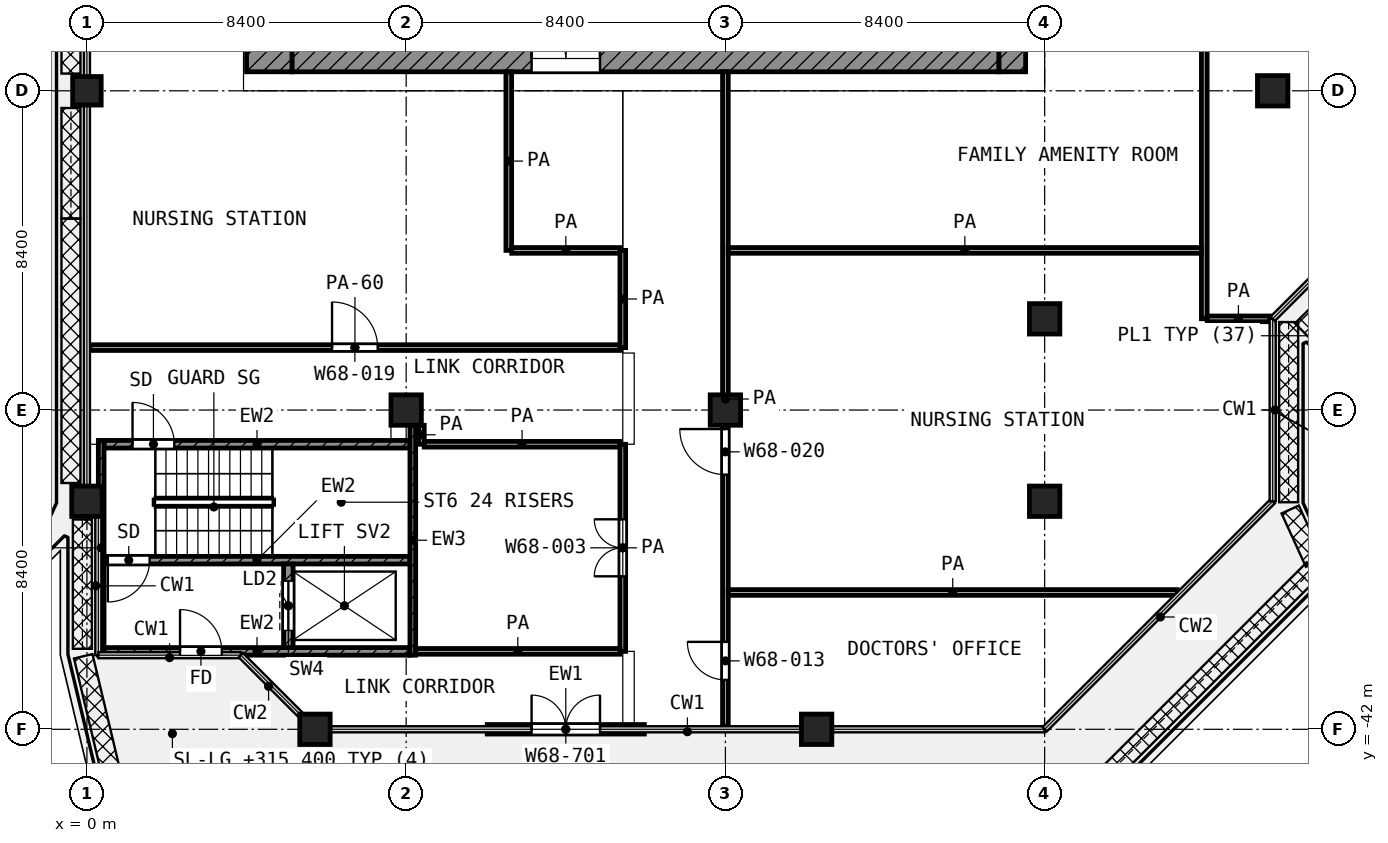
"""IFC4 building model, lengths in metres.
Left out: names, types, materials, properties, quantities, classifications, styles, units other than length and angle.
Written with IfcOpenShell. Run it as: python <this file> out.ifc"""

import sys

from ifc_helpers import new_model, si_unit, direction, frame, frame_2d, origin, origin_2d, place, context, subcontext, project, spatial, rectangle, extrude, element, fill, save


model = new_model("IFC4")
c1 = context("Model", 3, precision=1e-05, world=origin(), true_north=direction((0.0, 1.0)))
c2 = subcontext(c1, "Body", "Model", "MODEL_VIEW")
j1 = project(units=[si_unit("LENGTHUNIT", "METRE"), si_unit("PLANEANGLEUNIT", "RADIAN")], contexts=[c1])
p1 = place(None, origin())
s1 = spatial("IfcSite", under=j1, at=p1, CompositionType="ELEMENT")
p2 = place(p1, origin())
s2 = spatial("IfcBuilding", under=s1, at=p2, CompositionType="ELEMENT")
p3 = place(p2, frame((0.0, 0.0, 315.4)))
s3 = spatial("IfcBuildingStorey", under=s2, at=p3, CompositionType="ELEMENT", Elevation=315.4)
p4 = place(p3, frame((0.0, -25.2, 0.0), z_axis=(0.0, 0.0, 1.0), x_axis=(1.0, 0.0, 0.0)))
e1 = element("IfcColumn", 1, at=p4, inside=s3, PredefinedType="COLUMN", context=c2, shape_type="SweptSolid", body=[
    extrude(rectangle(XDim=0.75, YDim=0.75, at=origin_2d()), origin(), (0.0, 0.0, 1.0), 4.2),
])
for number, where, z_axis, x_axis in (
    (2, (31.2, -25.2, 0.0), (0.0, 0.0, 1.0), (1.0, 0.0, 0.0)),
    (3, (25.2, -31.2, 0.0), (0.0, 0.0, 1.0), (1.0, 0.0, 0.0)),
    (4, (8.4, -33.6, 0.0), (0.0, 0.0, 1.0), (1.0, 0.0, 0.0)),
    (5, (16.8, -33.6, 0.0), (0.0, 0.0, 1.0), (1.0, 0.0, 0.0)),
    (6, (0.0, -36.0, 0.0), (0.0, 0.0, 1.0), (1.0, 0.0, 0.0)),
    (7, (25.2, -36.0, 0.0), (0.0, 0.0, 1.0), (1.0, 0.0, 0.0)),
    (8, (6.0, -42.0, 0.0), (0.0, 0.0, 1.0), (1.0, 0.0, 0.0)),
    (9, (19.2, -42.0, 0.0), (0.0, 0.0, 1.0), (1.0, 0.0, 0.0)),
):
    element("IfcColumn", number, at=place(p3, frame(where, z_axis=z_axis, x_axis=x_axis)), inside=s3, PredefinedType="COLUMN", context=c2, shape_type="SweptSolid", body=[
        extrude(rectangle(XDim=0.8, YDim=0.8, at=origin_2d()), origin(), (0.0, 0.0, 1.0), 4.2),
    ])
p5 = place(p3, frame((10.533, -42.0, 0.0), z_axis=(0.0, 0.0, 1.0), x_axis=(1.0, 0.0, 0.0)))
e10 = element("IfcWall", 10, at=p5, inside=s3, PredefinedType="SOLIDWALL", context=c2, shape_type="SweptSolid", body=[
    extrude(rectangle(XDim=4.133, YDim=0.25, at=frame_2d((2.067, 0.0))), origin(), (0.0, 0.0, 1.0), 3.48),
])
p6 = place(p5, frame((1.167, 0.0, 0.0)))
e11 = element("IfcOpeningElement", 11, at=p6, cuts=e10, PredefinedType="OPENING", context=c2, shape_type="SweptSolid", body=[
    extrude(rectangle(XDim=1.8, YDim=2.1, at=frame_2d((0.9, 1.05))), frame((0.0, 0.135, 0.0), z_axis=(0.0, -1.0, 0.0), x_axis=(1.0, 0.0, 0.0)), (0.0, 0.0, 1.0), 0.27),
])
p7 = place(p3, frame((4.8, -24.7, 0.0), z_axis=(0.0, 0.0, 1.0), x_axis=(0.0, 1.0, 0.0)))
e12 = element("IfcWall", 12, at=p7, inside=s3, PredefinedType="SHEAR", context=c2, shape_type="SweptSolid", body=[
    extrude(rectangle(XDim=19.3, YDim=1.2, at=frame_2d((9.65, 0.0))), origin(), (0.0, 0.0, 1.0), 3.6),
])
p8 = place(p7, frame((11.15, 0.0, 0.0)))
e13 = element("IfcOpeningElement", 13, at=p8, cuts=e12, PredefinedType="OPENING", context=c2, shape_type="SweptSolid", body=[
    extrude(rectangle(XDim=1.1, YDim=2.1, at=frame_2d((0.55, 1.05))), frame((0.0, 0.61, 0.0), z_axis=(0.0, -1.0, 0.0), x_axis=(1.0, 0.0, 0.0)), (0.0, 0.0, 1.0), 1.22),
])
p9 = place(p7, frame((1.85, 0.0, 0.0)))
e14 = element("IfcOpeningElement", 14, at=p9, cuts=e12, PredefinedType="OPENING", context=c2, shape_type="SweptSolid", body=[
    extrude(rectangle(XDim=1.1, YDim=2.1, at=frame_2d((0.55, 1.05))), frame((0.0, 0.61, 0.0), z_axis=(0.0, -1.0, 0.0), x_axis=(1.0, 0.0, 0.0)), (0.0, 0.0, 1.0), 1.22),
])
p10 = place(p3, frame((5.4, -24.35, 0.0), z_axis=(0.0, 0.0, 1.0), x_axis=(1.0, 0.0, 0.0)))
e15 = element("IfcWall", 15, at=p10, inside=s3, PredefinedType="SHEAR", context=c2, shape_type="SweptSolid", body=[
    extrude(rectangle(XDim=18.6, YDim=0.7, at=frame_2d((9.3, 0.0))), origin(), (0.0, 0.0, 1.0), 3.6),
])
p11 = place(p10, frame((6.3, 0.0, 0.0)))
e16 = element("IfcOpeningElement", 16, at=p11, cuts=e15, PredefinedType="OPENING", context=c2, shape_type="SweptSolid", body=[
    extrude(rectangle(XDim=1.8, YDim=2.1, at=frame_2d((0.9, 1.05))), frame((0.0, 0.36, 0.0), z_axis=(0.0, -1.0, 0.0), x_axis=(1.0, 0.0, 0.0)), (0.0, 0.0, 1.0), 0.72),
])
p12 = place(p3, frame((24.35, -24.7, 0.0), z_axis=(0.0, 0.0, 1.0), x_axis=(0.0, 1.0, 0.0)))
e17 = element("IfcWall", 17, at=p12, inside=s3, PredefinedType="SHEAR", context=c2, shape_type="SweptSolid", body=[
    extrude(rectangle(XDim=0.7, YDim=0.7, at=frame_2d((0.35, 0.0))), origin(), (0.0, 0.0, 1.0), 3.6),
])
p13 = place(p3, frame((0.375, -40.05, 0.0), z_axis=(0.0, 0.0, 1.0), x_axis=(0.0, 1.0, 0.0)))
e18 = element("IfcWall", 18, at=p13, inside=s3, PredefinedType="SHEAR", context=c2, shape_type="SweptSolid", body=[
    extrude(rectangle(XDim=5.65, YDim=0.15, at=frame_2d((2.825, 0.0))), origin(), (0.0, 0.0, 1.0), 3.6),
])
p14 = place(p3, frame((8.575, -40.05, 0.0), z_axis=(0.0, 0.0, 1.0), x_axis=(0.0, 1.0, 0.0)))
e19 = element("IfcWall", 19, at=p14, inside=s3, PredefinedType="SHEAR", context=c2, shape_type="SweptSolid", body=[
    extrude(rectangle(XDim=6.05, YDim=0.15, at=frame_2d((3.025, 0.0))), origin(), (0.0, 0.0, 1.0), 3.6),
])
p15 = place(p3, frame((0.45, -34.5, 0.0), z_axis=(0.0, 0.0, 1.0), x_axis=(1.0, 0.0, 0.0)))
e20 = element("IfcWall", 20, at=p15, inside=s3, PredefinedType="SHEAR", context=c2, shape_type="SweptSolid", body=[
    extrude(rectangle(XDim=8.05, YDim=0.2, at=frame_2d((4.025, 0.0))), origin(), (0.0, 0.0, 1.0), 3.6),
])
p16 = place(p15, frame((0.75, 0.0, 0.0)))
e21 = element("IfcOpeningElement", 21, at=p16, cuts=e20, PredefinedType="OPENING", context=c2, shape_type="SweptSolid", body=[
    extrude(rectangle(XDim=1.1, YDim=2.1, at=frame_2d((0.55, 1.05))), frame((0.0, 0.11, 0.0), z_axis=(0.0, -1.0, 0.0), x_axis=(1.0, 0.0, 0.0)), (0.0, 0.0, 1.0), 0.22),
])
p17 = place(p3, frame((0.45, -37.55, 0.0), z_axis=(0.0, 0.0, 1.0), x_axis=(1.0, 0.0, 0.0)))
e22 = element("IfcWall", 22, at=p17, inside=s3, PredefinedType="SHEAR", context=c2, shape_type="SweptSolid", body=[
    extrude(rectangle(XDim=8.05, YDim=0.2, at=frame_2d((4.025, 0.0))), origin(), (0.0, 0.0, 1.0), 3.6),
])
p18 = place(p17, frame((0.1, 0.0, 0.0)))
e23 = element("IfcOpeningElement", 23, at=p18, cuts=e22, PredefinedType="OPENING", context=c2, shape_type="SweptSolid", body=[
    extrude(rectangle(XDim=1.1, YDim=2.1, at=frame_2d((0.55, 1.05))), frame((0.0, 0.11, 0.0), z_axis=(0.0, -1.0, 0.0), x_axis=(1.0, 0.0, 0.0)), (0.0, 0.0, 1.0), 0.22),
])
p19 = place(p3, frame((0.45, -39.95, 0.0), z_axis=(0.0, 0.0, 1.0), x_axis=(1.0, 0.0, 0.0)))
e24 = element("IfcWall", 24, at=p19, inside=s3, PredefinedType="SHEAR", context=c2, shape_type="SweptSolid", body=[
    extrude(rectangle(XDim=8.05, YDim=0.2, at=frame_2d((4.025, 0.0))), origin(), (0.0, 0.0, 1.0), 3.6),
])
p20 = place(p19, frame((2.0, 0.0, 0.0)))
e25 = element("IfcOpeningElement", 25, at=p20, cuts=e24, PredefinedType="OPENING", context=c2, shape_type="SweptSolid", body=[
    extrude(rectangle(XDim=1.1, YDim=2.1, at=frame_2d((0.55, 1.05))), frame((0.0, 0.11, 0.0), z_axis=(0.0, -1.0, 0.0), x_axis=(1.0, 0.0, 0.0)), (0.0, 0.0, 1.0), 0.22),
])
p21 = place(p3, frame((5.3, -39.85, 0.0), z_axis=(0.0, 0.0, 1.0), x_axis=(0.0, 1.0, 0.0)))
e26 = element("IfcWall", 26, at=p21, inside=s3, PredefinedType="SHEAR", context=c2, shape_type="SweptSolid", body=[
    extrude(rectangle(XDim=2.2, YDim=0.25, at=frame_2d((1.1, 0.0))), origin(), (0.0, 0.0, 1.0), 3.6),
])
p22 = place(p21, frame((0.45, 0.0, 0.0)))
e27 = element("IfcOpeningElement", 27, at=p22, cuts=e26, PredefinedType="OPENING", context=c2, shape_type="SweptSolid", body=[
    extrude(rectangle(XDim=1.3, YDim=2.1, at=frame_2d((0.65, 1.05))), frame((0.0, 0.135, 0.0), z_axis=(0.0, -1.0, 0.0), x_axis=(1.0, 0.0, 0.0)), (0.0, 0.0, 1.0), 0.27),
])
p23 = place(p3, frame((8.65, -39.95, 0.0), z_axis=(0.0, 0.0, 1.0), x_axis=(1.0, 0.0, 0.0)))
e28 = element("IfcWall", 28, at=p23, inside=s3, PredefinedType="PARTITIONING", context=c2, shape_type="SweptSolid", body=[
    extrude(rectangle(XDim=5.375, YDim=0.15, at=frame_2d((2.688, 0.0))), origin(), (0.0, 0.0, 1.0), 3.6),
])
p24 = place(p3, frame((16.875, -38.4, 0.0), z_axis=(0.0, 0.0, 1.0), x_axis=(1.0, 0.0, 0.0)))
e29 = element("IfcWall", 29, at=p24, inside=s3, PredefinedType="PARTITIONING", context=c2, shape_type="SweptSolid", body=[
    extrude(rectangle(XDim=11.812, YDim=0.15, at=frame_2d((5.906, 0.0))), origin(), (0.0, 0.0, 1.0), 3.6),
])
p25 = place(p3, frame((8.875, -34.5, 0.0), z_axis=(0.0, 0.0, 1.0), x_axis=(1.0, 0.0, 0.0)))
e30 = element("IfcWall", 30, at=p25, inside=s3, PredefinedType="PARTITIONING", context=c2, shape_type="SweptSolid", body=[
    extrude(rectangle(XDim=5.15, YDim=0.15, at=frame_2d((2.575, 0.0))), origin(), (0.0, 0.0, 1.0), 3.6),
])
p26 = place(p3, frame((0.08, -31.957, 0.0), z_axis=(0.0, 0.0, 1.0), x_axis=(1.0, 0.0, 0.0)))
e31 = element("IfcWall", 31, at=p26, inside=s3, PredefinedType="PARTITIONING", context=c2, shape_type="SweptSolid", body=[
    extrude(rectangle(XDim=13.945, YDim=0.15, at=frame_2d((6.972, 0.0))), origin(), (0.0, 0.0, 1.0), 2.7),
])
p27 = place(p26, frame((6.37, 0.0, 0.0)))
e32 = element("IfcOpeningElement", 32, at=p27, cuts=e31, PredefinedType="OPENING", context=c2, shape_type="SweptSolid", body=[
    extrude(rectangle(XDim=1.2, YDim=2.1, at=frame_2d((0.6, 1.05))), frame((0.0, 0.085, 0.0), z_axis=(0.0, -1.0, 0.0), x_axis=(1.0, 0.0, 0.0)), (0.0, 0.0, 1.0), 0.17),
])
p28 = place(p3, frame((29.477, -31.2, 0.0), z_axis=(0.0, 0.0, 1.0), x_axis=(1.0, 0.0, 0.0)))
e33 = element("IfcWall", 33, at=p28, inside=s3, PredefinedType="PARTITIONING", context=c2, shape_type="SweptSolid", body=[
    extrude(rectangle(XDim=1.643, YDim=0.15, at=frame_2d((0.822, 0.0))), origin(), (0.0, 0.0, 1.0), 3.6),
])
p29 = place(p3, frame((11.177, -29.4, 0.0), z_axis=(0.0, 0.0, 1.0), x_axis=(1.0, 0.0, 0.0)))
e34 = element("IfcWall", 34, at=p29, inside=s3, PredefinedType="PARTITIONING", context=c2, shape_type="SweptSolid", body=[
    extrude(rectangle(XDim=2.848, YDim=0.15, at=frame_2d((1.424, 0.0))), origin(), (0.0, 0.0, 1.0), 3.6),
])
p30 = place(p3, frame((16.875, -29.4, 0.0), z_axis=(0.0, 0.0, 1.0), x_axis=(1.0, 0.0, 0.0)))
e35 = element("IfcWall", 35, at=p30, inside=s3, PredefinedType="PARTITIONING", context=c2, shape_type="SweptSolid", body=[
    extrude(rectangle(XDim=12.45, YDim=0.15, at=frame_2d((6.225, 0.0))), origin(), (0.0, 0.0, 1.0), 3.6),
])
p31 = place(p3, frame((8.8, -34.5, 0.0), z_axis=(0.0, 0.0, 1.0), x_axis=(0.0, 1.0, 0.0)))
e36 = element("IfcWall", 36, at=p31, inside=s3, PredefinedType="PARTITIONING", context=c2, shape_type="SweptSolid", body=[
    extrude(rectangle(XDim=0.499, YDim=0.15, at=frame_2d((0.25, 0.0))), origin(), (0.0, 0.0, 1.0), 3.6),
])
p32 = place(p3, frame((11.1, -29.399, 0.0), z_axis=(0.0, 0.0, 1.0), x_axis=(0.0, 1.0, 0.0)))
e37 = element("IfcWall", 37, at=p32, inside=s3, PredefinedType="PARTITIONING", context=c2, shape_type="SweptSolid", body=[
    extrude(rectangle(XDim=4.699, YDim=0.15, at=frame_2d((2.35, 0.0))), origin(), (0.0, 0.0, 1.0), 3.6),
])
p33 = place(p3, frame((14.1, -39.95, 0.0), z_axis=(0.0, 0.0, 1.0), x_axis=(0.0, 1.0, 0.0)))
e38 = element("IfcWall", 38, at=p33, inside=s3, PredefinedType="PARTITIONING", context=c2, shape_type="SweptSolid", body=[
    extrude(rectangle(XDim=5.45, YDim=0.15, at=frame_2d((2.725, 0.0))), origin(), (0.0, 0.0, 1.0), 3.6),
])
p34 = place(p33, frame((1.975, 0.0, 0.0)))
e39 = element("IfcOpeningElement", 39, at=p34, cuts=e38, PredefinedType="OPENING", context=c2, shape_type="SweptSolid", body=[
    extrude(rectangle(XDim=1.5, YDim=2.1, at=frame_2d((0.75, 1.05))), frame((0.0, 0.085, 0.0), z_axis=(0.0, -1.0, 0.0), x_axis=(1.0, 0.0, 0.0)), (0.0, 0.0, 1.0), 0.17),
])
p35 = place(p3, frame((14.1, -31.957, 0.0), z_axis=(0.0, 0.0, 1.0), x_axis=(0.0, 1.0, 0.0)))
e40 = element("IfcWall", 40, at=p35, inside=s3, PredefinedType="PARTITIONING", context=c2, shape_type="SweptSolid", body=[
    extrude(rectangle(XDim=2.557, YDim=0.15, at=frame_2d((1.279, 0.0))), origin(), (0.0, 0.0, 1.0), 3.6),
])
p36 = place(p3, frame((16.8, -41.92, 0.0), z_axis=(0.0, 0.0, 1.0), x_axis=(0.0, 1.0, 0.0)))
e41 = element("IfcWall", 41, at=p36, inside=s3, PredefinedType="PARTITIONING", context=c2, shape_type="SweptSolid", body=[
    extrude(rectangle(XDim=17.22, YDim=0.15, at=frame_2d((8.61, 0.0))), origin(), (0.0, 0.0, 1.0), 3.6),
])
p37 = place(p36, frame((6.62, 0.0, 0.0)))
e42 = element("IfcOpeningElement", 42, at=p37, cuts=e41, PredefinedType="OPENING", context=c2, shape_type="SweptSolid", body=[
    extrude(rectangle(XDim=1.2, YDim=2.1, at=frame_2d((0.6, 1.05))), frame((0.0, 0.085, 0.0), z_axis=(0.0, -1.0, 0.0), x_axis=(1.0, 0.0, 0.0)), (0.0, 0.0, 1.0), 0.17),
])
p38 = place(p36, frame((1.22, 0.0, 0.0)))
e43 = element("IfcOpeningElement", 43, at=p38, cuts=e41, PredefinedType="OPENING", context=c2, shape_type="SweptSolid", body=[
    extrude(rectangle(XDim=1.0, YDim=2.1, at=frame_2d((0.5, 1.05))), frame((0.0, 0.085, 0.0), z_axis=(0.0, -1.0, 0.0), x_axis=(1.0, 0.0, 0.0)), (0.0, 0.0, 1.0), 0.17),
])
p39 = place(p3, frame((29.4, -31.198, 0.0), z_axis=(0.0, 0.0, 1.0), x_axis=(0.0, 1.0, 0.0)))
e44 = element("IfcWall", 44, at=p39, inside=s3, PredefinedType="PARTITIONING", context=c2, shape_type="SweptSolid", body=[
    extrude(rectangle(XDim=14.323, YDim=0.15, at=frame_2d((7.162, 0.0))), origin(), (0.0, 0.0, 1.0), 3.6),
])
p40 = place(p6, origin())
e45 = element("IfcDoor", 45, at=p40, inside=s3, OperationType="DOUBLE_DOOR_SINGLE_SWING", PredefinedType="DOOR", context=c2, shape_type="SweptSolid", body=[
    extrude(rectangle(XDim=1.8, YDim=2.1, at=frame_2d((0.9, 1.05))), frame((0.0, 0.025, 0.0), z_axis=(0.0, -1.0, 0.0), x_axis=(1.0, 0.0, 0.0)), (0.0, 0.0, 1.0), 0.05),
])
fill(e11, e45)
p41 = place(p11, origin())
e46 = element("IfcDoor", 46, at=p41, inside=s3, OperationType="DOUBLE_DOOR_SINGLE_SWING", PredefinedType="DOOR", context=c2, shape_type="SweptSolid", body=[
    extrude(rectangle(XDim=1.8, YDim=2.1, at=frame_2d((0.9, 1.05))), frame((0.0, 0.025, 0.0), z_axis=(0.0, -1.0, 0.0), x_axis=(1.0, 0.0, 0.0)), (0.0, 0.0, 1.0), 0.05),
])
fill(e16, e46)
p42 = place(p16, origin())
e47 = element("IfcDoor", 47, at=p42, inside=s3, OperationType="SINGLE_SWING_LEFT", PredefinedType="DOOR", context=c2, shape_type="SweptSolid", body=[
    extrude(rectangle(XDim=1.1, YDim=2.1, at=frame_2d((0.55, 1.05))), frame((0.0, 0.025, 0.0), z_axis=(0.0, -1.0, 0.0), x_axis=(1.0, 0.0, 0.0)), (0.0, 0.0, 1.0), 0.05),
])
fill(e21, e47)
p43 = place(p18, frame((1.1, 0.0, 0.0), z_axis=(0.0, 0.0, 1.0), x_axis=(-1.0, 0.0, 0.0)))
e48 = element("IfcDoor", 48, at=p43, inside=s3, OperationType="SINGLE_SWING_LEFT", PredefinedType="DOOR", context=c2, shape_type="SweptSolid", body=[
    extrude(rectangle(XDim=1.1, YDim=2.1, at=frame_2d((0.55, 1.05))), frame((0.0, 0.025, 0.0), z_axis=(0.0, -1.0, 0.0), x_axis=(1.0, 0.0, 0.0)), (0.0, 0.0, 1.0), 0.05),
])
fill(e23, e48)
p44 = place(p22, origin())
e49 = element("IfcDoor", 49, at=p44, inside=s3, OperationType="DOUBLE_DOOR_SLIDING", PredefinedType="DOOR", context=c2, shape_type="SweptSolid", body=[
    extrude(rectangle(XDim=1.3, YDim=2.1, at=frame_2d((0.65, 1.05))), frame((0.0, 0.025, 0.0), z_axis=(0.0, -1.0, 0.0), x_axis=(1.0, 0.0, 0.0)), (0.0, 0.0, 1.0), 0.05),
])
fill(e27, e49)
p45 = place(p20, origin())
e50 = element("IfcDoor", 50, at=p45, inside=s3, OperationType="SINGLE_SWING_LEFT", PredefinedType="DOOR", context=c2, shape_type="SweptSolid", body=[
    extrude(rectangle(XDim=1.1, YDim=2.1, at=frame_2d((0.55, 1.05))), frame((0.0, 0.025, 0.0), z_axis=(0.0, -1.0, 0.0), x_axis=(1.0, 0.0, 0.0)), (0.0, 0.0, 1.0), 0.05),
])
fill(e25, e50)
p46 = place(p27, origin())
e51 = element("IfcDoor", 51, at=p46, inside=s3, OperationType="SINGLE_SWING_LEFT", PredefinedType="DOOR", context=c2, shape_type="SweptSolid", body=[
    extrude(rectangle(XDim=1.2, YDim=2.1, at=frame_2d((0.6, 1.05))), frame((0.0, 0.025, 0.0), z_axis=(0.0, -1.0, 0.0), x_axis=(1.0, 0.0, 0.0)), (0.0, 0.0, 1.0), 0.05),
])
fill(e32, e51)
p47 = place(p34, origin())
e52 = element("IfcDoor", 52, at=p47, inside=s3, OperationType="DOUBLE_DOOR_SINGLE_SWING", PredefinedType="DOOR", context=c2, shape_type="SweptSolid", body=[
    extrude(rectangle(XDim=1.5, YDim=2.1, at=frame_2d((0.75, 1.05))), frame((0.0, 0.025, 0.0), z_axis=(0.0, -1.0, 0.0), x_axis=(1.0, 0.0, 0.0)), (0.0, 0.0, 1.0), 0.05),
])
fill(e39, e52)
p48 = place(p37, origin())
e53 = element("IfcDoor", 53, at=p48, inside=s3, OperationType="SINGLE_SWING_RIGHT", PredefinedType="DOOR", context=c2, shape_type="SweptSolid", body=[
    extrude(rectangle(XDim=1.2, YDim=2.1, at=frame_2d((0.6, 1.05))), frame((0.0, 0.025, 0.0), z_axis=(0.0, -1.0, 0.0), x_axis=(1.0, 0.0, 0.0)), (0.0, 0.0, 1.0), 0.05),
])
fill(e42, e53)
p49 = place(p38, origin())
e54 = element("IfcDoor", 54, at=p49, inside=s3, OperationType="SINGLE_SWING_RIGHT", PredefinedType="DOOR", context=c2, shape_type="SweptSolid", body=[
    extrude(rectangle(XDim=1.0, YDim=2.1, at=frame_2d((0.5, 1.05))), frame((0.0, 0.025, 0.0), z_axis=(0.0, -1.0, 0.0), x_axis=(1.0, 0.0, 0.0)), (0.0, 0.0, 1.0), 0.05),
])
fill(e43, e54)
save(model, sys.argv[1])
